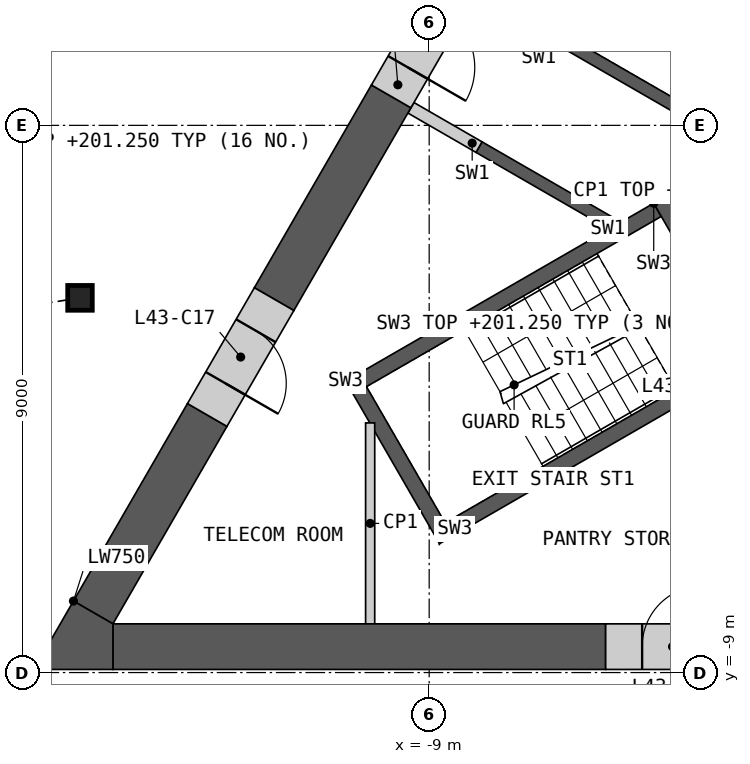
"""IFC4 building model, lengths in metres.
Left out: names, types, materials, properties, quantities, classifications, styles, units other than length and angle.
Written with IfcOpenShell. Run it as: python <this file> out.ifc"""

import sys

from ifc_helpers import new_model, si_unit, direction, frame, frame_2d, origin, origin_2d, place, context, subcontext, project, spatial, polyline, rectangle, i_section, outline, extrude, element, fill, save


model = new_model("IFC4")
c1 = context("Model", 3, precision=1e-05, world=origin(), true_north=direction((0.0, 1.0)))
c2 = subcontext(c1, "Body", "Model", "MODEL_VIEW")
j1 = project(units=[si_unit("LENGTHUNIT", "METRE"), si_unit("PLANEANGLEUNIT", "RADIAN")], contexts=[c1])
p1 = place(None, origin())
s1 = spatial("IfcSite", under=j1, at=p1, CompositionType="ELEMENT")
p2 = place(p1, origin())
s2 = spatial("IfcBuilding", under=s1, at=p2, CompositionType="ELEMENT")
p3 = place(p2, frame((0.0, 0.0, 198.0)))
s3 = spatial("IfcBuildingStorey", under=s2, at=p3, CompositionType="ELEMENT", Elevation=198.0)
p4 = place(p3, frame((-14.743, -2.837, 0.0), z_axis=(0.0, 0.0, 1.0), x_axis=(1.0, 0.0, 0.0)))
e1 = element("IfcColumn", 1, at=p4, inside=s3, PredefinedType="COLUMN", context=c2, shape_type="SweptSolid", body=[
    extrude(i_section(OverallWidth=0.404, OverallDepth=0.407, WebThickness=0.027, FlangeThickness=0.044, at=origin_2d()), origin(), (0.0, 0.0, 1.0), 3.6),
])
p5 = place(p3, origin())
e2 = element("IfcWall", 2, at=p5, inside=s3, PredefinedType="SHEAR", context=c2, shape_type="SweptSolid", body=[
    extrude(outline(polyline([(-6.061, -1.697), (-8.231, -0.444), (-8.131, -0.271), (-5.96, -1.524), (-6.061, -1.697)])), origin(), (0.0, 0.0, 1.0), 3.25),
])
p6 = place(p3, origin())
e3 = element("IfcWall", 3, at=p6, inside=s3, PredefinedType="SHEAR", context=c2, shape_type="SweptSolid", body=[
    extrude(outline(polyline([(-4.96, 0.208), (-7.131, 1.461), (-3.731, 7.35), (-1.561, 6.097), (-1.66, 5.924), (-3.652, 7.074), (-4.652, 5.342), (-2.66, 4.192), (-2.76, 4.019), (-4.752, 5.169), (-5.752, 3.437), (-3.76, 2.287), (-3.861, 2.113), (-5.852, 3.263), (-6.852, 1.531), (-4.861, 0.381), (-4.96, 0.208)])), origin(), (0.0, 0.0, 1.0), 3.25),
])
p7 = place(p3, frame((-8.181, -0.357, 0.0), z_axis=(0.0, 0.0, 1.0), x_axis=(-0.866003189247, 0.500038474733, 0.0)))
e4 = element("IfcWall", 4, at=p7, inside=s3, PredefinedType="SHEAR", context=c2, shape_type="SweptSolid", body=[
    extrude(rectangle(XDim=1.293, YDim=0.2, at=frame_2d((0.646, 0.0))), origin(), (0.0, 0.0, 1.0), 3.25),
])
p8 = place(p3, origin())
e5 = element("IfcWall", 5, at=p8, inside=s3, PredefinedType="SHEAR", context=c2, shape_type="SweptSolid", body=[
    extrude(outline(polyline([(-5.307, -1.281), (-10.374, -4.206), (-10.032, -4.298), (-5.182, -1.498), (-5.307, -1.281)])), origin(), (0.0, 0.0, 1.0), 3.25),
])
p9 = place(p3, origin())
e6 = element("IfcWall", 6, at=p9, inside=s3, PredefinedType="SHEAR", context=c2, shape_type="SweptSolid", body=[
    extrude(outline(polyline([(-10.374, -4.206), (-8.83, -6.881), (-8.738, -6.539), (-10.032, -4.298), (-10.374, -4.206)])), origin(), (0.0, 0.0, 1.0), 3.25),
])
p10 = place(p3, origin())
e7 = element("IfcWall", 7, at=p10, inside=s3, PredefinedType="SHEAR", context=c2, shape_type="SweptSolid", body=[
    extrude(outline(polyline([(-8.738, -6.539), (-8.83, -6.881), (-3.763, -3.956), (-3.888, -3.739), (-8.738, -6.539)])), origin(), (0.0, 0.0, 1.0), 3.25),
])
p11 = place(p3, frame((-5.199, -1.219, 0.0), z_axis=(0.0, 0.0, 1.0), x_axis=(0.499982516597, -0.866035497597, 0.0)))
e8 = element("IfcWall", 8, at=p11, inside=s3, PredefinedType="SHEAR", context=c2, shape_type="SweptSolid", body=[
    extrude(rectangle(XDim=3.088, YDim=0.25, at=frame_2d((1.544, 0.0))), origin(), (0.0, 0.0, 1.0), 3.25),
])
p12 = place(p11, frame((0.994, 0.0, 0.0)))
e9 = element("IfcOpeningElement", 9, at=p12, cuts=e8, PredefinedType="OPENING", context=c2, shape_type="SweptSolid", body=[
    extrude(rectangle(XDim=1.1, YDim=2.1, at=frame_2d((0.55, 1.05))), frame((0.0, 0.135, 0.0), z_axis=(0.0, -1.0, 0.0), x_axis=(1.0, 0.0, 0.0)), (0.0, 0.0, 1.0), 0.27),
])
p13 = place(p3, frame((-9.971, -8.199, 0.0), z_axis=(0.0, 0.0, 1.0), x_axis=(0.0, 1.0, 0.0)))
e10 = element("IfcWall", 10, at=p13, inside=s3, PredefinedType="PARTITIONING", context=c2, shape_type="SweptSolid", body=[
    extrude(rectangle(XDim=3.305, YDim=0.15, at=frame_2d((1.652, 0.0))), origin(), (0.0, 0.0, 1.0), 3.25),
])
p14 = place(p3, frame((-14.201, -8.574, 0.0), z_axis=(0.0, 0.0, 1.0), x_axis=(1.0, 0.0, 0.0)))
e11 = element("IfcWall", 11, at=p14, inside=s3, PredefinedType="SHEAR", context=c2, shape_type="SweptSolid", body=[
    extrude(rectangle(XDim=8.103, YDim=0.75, at=frame_2d((4.052, 0.0))), origin(), (0.0, 0.0, 1.0), 3.25),
])
p15 = place(p3, frame((-9.625, 0.477, 0.0), z_axis=(0.0, 0.0, 1.0), x_axis=(-0.499951145694, -0.866053607994, 0.0)))
e12 = element("IfcWall", 12, at=p15, inside=s3, PredefinedType="SHEAR", context=c2, shape_type="SweptSolid", body=[
    extrude(rectangle(XDim=3.851, YDim=0.75, at=frame_2d((1.925, 0.0))), origin(), (0.0, 0.0, 1.0), 3.25),
])
p16 = place(p3, frame((-12.65, -4.763, 0.0), z_axis=(0.0, 0.0, 1.0), x_axis=(-0.499996681051, -0.866027319972, 0.0)))
e13 = element("IfcWall", 13, at=p16, inside=s3, PredefinedType="SHEAR", context=c2, shape_type="SweptSolid", body=[
    extrude(rectangle(XDim=3.75, YDim=0.75, at=frame_2d((1.875, 0.0))), origin(), (0.0, 0.0, 1.0), 3.25),
])
p17 = place(p3, origin())
e14 = element("IfcWall", 14, at=p17, inside=s3, PredefinedType="SHEAR", context=c2, shape_type="SweptSolid", body=[
    extrude(outline(polyline([(-14.851, -7.824), (-14.201, -8.199), (-14.201, -8.949), (-15.5, -8.949), (-14.851, -7.824)])), origin(), (0.0, 0.0, 1.0), 3.25),
])
p18 = place(p3, frame((-6.098, -8.574, 0.0), z_axis=(0.0, 0.0, 1.0), x_axis=(1.0, 0.0, 0.0)))
e15 = element("IfcWall", 15, at=p18, inside=s3, PredefinedType="SHEAR", context=c2, shape_type="SweptSolid", body=[
    extrude(rectangle(XDim=2.2, YDim=0.75, at=frame_2d((1.1, 0.0))), origin(), (0.0, 0.0, 1.0), 3.25),
])
p19 = place(p18, frame((0.6, 0.0, 0.0)))
e16 = element("IfcOpeningElement", 16, at=p19, cuts=e15, PredefinedType="OPENING", context=c2, shape_type="SweptSolid", body=[
    extrude(rectangle(XDim=1.0, YDim=2.1, at=frame_2d((0.5, 1.05))), frame((0.0, 0.385, 0.0), z_axis=(0.0, -1.0, 0.0), x_axis=(1.0, 0.0, 0.0)), (0.0, 0.0, 1.0), 0.77),
])
p20 = place(p3, frame((-11.551, -2.858, 0.0), z_axis=(0.0, 0.0, 1.0), x_axis=(-0.499946605688, -0.86605622881, 0.0)))
e17 = element("IfcWall", 17, at=p20, inside=s3, PredefinedType="SHEAR", context=c2, shape_type="SweptSolid", body=[
    extrude(rectangle(XDim=2.2, YDim=0.75, at=frame_2d((1.1, 0.0))), origin(), (0.0, 0.0, 1.0), 3.25),
])
p21 = place(p20, frame((0.6, 0.0, 0.0)))
e18 = element("IfcOpeningElement", 18, at=p21, cuts=e17, PredefinedType="OPENING", context=c2, shape_type="SweptSolid", body=[
    extrude(rectangle(XDim=1.0, YDim=2.1, at=frame_2d((0.5, 1.05))), frame((0.0, 0.385, 0.0), z_axis=(0.0, -1.0, 0.0), x_axis=(1.0, 0.0, 0.0)), (0.0, 0.0, 1.0), 0.77),
])
p22 = place(p3, frame((-8.525, 2.382, 0.0), z_axis=(0.0, 0.0, 1.0), x_axis=(-0.500077893725, -0.86598042715, 0.0)))
e19 = element("IfcWall", 19, at=p22, inside=s3, PredefinedType="SHEAR", context=c2, shape_type="SweptSolid", body=[
    extrude(rectangle(XDim=2.2, YDim=0.75, at=frame_2d((1.1, 0.0))), origin(), (0.0, 0.0, 1.0), 3.25),
])
p23 = place(p22, frame((0.55, 0.0, 0.0)))
e20 = element("IfcOpeningElement", 20, at=p23, cuts=e19, PredefinedType="OPENING", context=c2, shape_type="SweptSolid", body=[
    extrude(rectangle(XDim=1.1, YDim=2.1, at=frame_2d((0.55, 1.05))), frame((0.0, 0.385, 0.0), z_axis=(0.0, -1.0, 0.0), x_axis=(1.0, 0.0, 0.0)), (0.0, 0.0, 1.0), 0.77),
])
p24 = place(p3, frame((-19.476, -5.035, 0.0), z_axis=(0.0, 0.0, 1.0), x_axis=(0.500000757641, 0.86602496636, 0.0)))
e21 = element("IfcWall", 21, at=p24, inside=s3, PredefinedType="PARTITIONING", context=c2, shape_type="SweptSolid", body=[
    extrude(rectangle(XDim=28.198, YDim=0.2, at=frame_2d((14.099, 0.0))), origin(), (0.0, 0.0, 1.0), 3.25),
])
p25 = place(p24, frame((25.796, 0.0, 0.0)))
e22 = element("IfcOpeningElement", 22, at=p25, cuts=e21, PredefinedType="OPENING", context=c2, shape_type="SweptSolid", body=[
    extrude(rectangle(XDim=0.95, YDim=2.1, at=frame_2d((0.475, 1.05))), frame((0.0, 0.11, 0.0), z_axis=(0.0, -1.0, 0.0), x_axis=(1.0, 0.0, 0.0)), (0.0, 0.0, 1.0), 0.22),
])
p26 = place(p24, frame((14.603, 0.0, 0.0)))
e23 = element("IfcOpeningElement", 23, at=p26, cuts=e21, PredefinedType="OPENING", context=c2, shape_type="SweptSolid", body=[
    extrude(rectangle(XDim=1.1, YDim=2.1, at=frame_2d((0.55, 1.05))), frame((0.0, 0.11, 0.0), z_axis=(0.0, -1.0, 0.0), x_axis=(1.0, 0.0, 0.0)), (0.0, 0.0, 1.0), 0.22),
])
p27 = place(p24, frame((11.993, 0.0, 0.0)))
e24 = element("IfcOpeningElement", 24, at=p27, cuts=e21, PredefinedType="OPENING", context=c2, shape_type="SweptSolid", body=[
    extrude(rectangle(XDim=1.1, YDim=2.1, at=frame_2d((0.55, 1.05))), frame((0.0, 0.11, 0.0), z_axis=(0.0, -1.0, 0.0), x_axis=(1.0, 0.0, 0.0)), (0.0, 0.0, 1.0), 0.22),
])
p28 = place(p24, frame((1.452, 0.0, 0.0)))
e25 = element("IfcOpeningElement", 25, at=p28, cuts=e21, PredefinedType="OPENING", context=c2, shape_type="SweptSolid", body=[
    extrude(rectangle(XDim=0.95, YDim=2.1, at=frame_2d((0.475, 1.05))), frame((0.0, 0.11, 0.0), z_axis=(0.0, -1.0, 0.0), x_axis=(1.0, 0.0, 0.0)), (0.0, 0.0, 1.0), 0.22),
])
p29 = place(p19, origin())
e26 = element("IfcDoor", 26, at=p29, inside=s3, OperationType="SINGLE_SWING_RIGHT", PredefinedType="DOOR", context=c2, shape_type="SweptSolid", body=[
    extrude(rectangle(XDim=1.0, YDim=2.1, at=frame_2d((0.5, 1.05))), frame((0.0, 0.13, 0.0), z_axis=(0.0, -1.0, 0.0), x_axis=(1.0, 0.0, 0.0)), (0.0, 0.0, 1.0), 0.05),
])
fill(e16, e26)
p30 = place(p21, origin())
e27 = element("IfcDoor", 27, at=p30, inside=s3, OperationType="SINGLE_SWING_RIGHT", PredefinedType="DOOR", context=c2, shape_type="SweptSolid", body=[
    extrude(rectangle(XDim=1.0, YDim=2.1, at=frame_2d((0.5, 1.05))), frame((0.0, 0.13, 0.0), z_axis=(0.0, -1.0, 0.0), x_axis=(1.0, 0.0, 0.0)), (0.0, 0.0, 1.0), 0.05),
])
fill(e18, e27)
p31 = place(p23, origin())
e28 = element("IfcDoor", 28, at=p31, inside=s3, OperationType="SINGLE_SWING_RIGHT", PredefinedType="DOOR", context=c2, shape_type="SweptSolid", body=[
    extrude(rectangle(XDim=1.1, YDim=2.1, at=frame_2d((0.55, 1.05))), frame((0.0, 0.13, 0.0), z_axis=(0.0, -1.0, 0.0), x_axis=(1.0, 0.0, 0.0)), (0.0, 0.0, 1.0), 0.05),
])
fill(e20, e28)
save(model, sys.argv[1])
